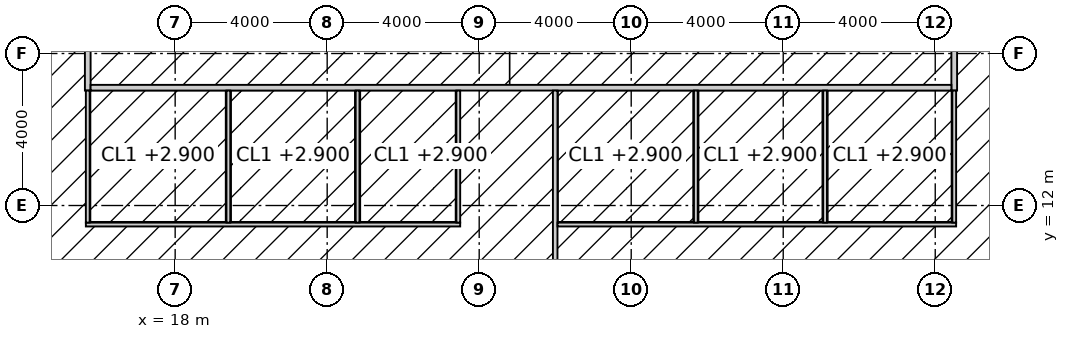
"""IFC4 building model, lengths in metres.
Left out: names, types, materials, properties, quantities, classifications, styles, units other than length and angle.
Written with IfcOpenShell. Run it as: python <this file> out.ifc"""

import sys

from ifc_helpers import new_model, si_unit, direction, frame, frame_2d, origin, place, context, subcontext, project, spatial, rectangle, extrude, element, fill, save


model = new_model("IFC4")
c1 = context("Model", 3, precision=1e-05, world=origin(), true_north=direction((0.0, 1.0)))
c2 = subcontext(c1, "Body", "Model", "MODEL_VIEW")
j1 = project(units=[si_unit("LENGTHUNIT", "METRE"), si_unit("PLANEANGLEUNIT", "RADIAN")], contexts=[c1])
p1 = place(None, origin())
s1 = spatial("IfcSite", under=j1, at=p1, CompositionType="ELEMENT")
p2 = place(p1, origin())
s2 = spatial("IfcBuilding", under=s1, at=p2, CompositionType="ELEMENT")
p3 = place(p2, frame((0.0, 0.0, 254.2)))
s3 = spatial("IfcBuildingStorey", under=s2, at=p3, CompositionType="ELEMENT", Elevation=254.2)
p4 = place(p3, frame((15.7, 15.025, 0.0), z_axis=(0.0, 0.0, 1.0), x_axis=(0.0, 1.0, 0.0)))
e1 = element("IfcWall", 1, at=p4, inside=s3, PredefinedType="PARTITIONING", context=c2, shape_type="SweptSolid", body=[
    extrude(rectangle(XDim=23.35, YDim=0.15, at=frame_2d((11.675, 0.0))), origin(), (0.0, 0.0, 1.0), 3.85),
])
p5 = place(p4, frame((10.775, 0.0, 0.0)))
e2 = element("IfcOpeningElement", 2, at=p5, cuts=e1, PredefinedType="OPENING", context=c2, shape_type="SweptSolid", body=[
    extrude(rectangle(XDim=1.8, YDim=2.4, at=frame_2d((0.9, 1.2))), frame((0.0, 0.085, 0.0), z_axis=(0.0, -1.0, 0.0), x_axis=(1.0, 0.0, 0.0)), (0.0, 0.0, 1.0), 0.17),
])
p6 = place(p3, frame((38.5, 15.025, 0.0), z_axis=(0.0, 0.0, 1.0), x_axis=(0.0, 1.0, 0.0)))
e3 = element("IfcWall", 3, at=p6, inside=s3, PredefinedType="PARTITIONING", context=c2, shape_type="SweptSolid", body=[
    extrude(rectangle(XDim=23.35, YDim=0.15, at=frame_2d((11.675, 0.0))), origin(), (0.0, 0.0, 1.0), 3.85),
])
p7 = place(p6, frame((7.275, 0.0, 0.0)))
e4 = element("IfcOpeningElement", 4, at=p7, cuts=e3, PredefinedType="OPENING", context=c2, shape_type="SweptSolid", body=[
    extrude(rectangle(XDim=1.8, YDim=2.4, at=frame_2d((0.9, 1.2))), frame((0.0, 0.085, 0.0), z_axis=(0.0, -1.0, 0.0), x_axis=(1.0, 0.0, 0.0)), (0.0, 0.0, 1.0), 0.17),
])
p8 = place(p6, frame((18.826, 0.0, 0.0)))
e5 = element("IfcOpeningElement", 5, at=p8, cuts=e3, PredefinedType="OPENING", context=c2, shape_type="SweptSolid", body=[
    extrude(rectangle(XDim=1.8, YDim=2.4, at=frame_2d((0.9, 1.2))), frame((0.0, 0.085, 0.0), z_axis=(0.0, -1.0, 0.0), x_axis=(1.0, 0.0, 0.0)), (0.0, 0.0, 1.0), 0.17),
])
p9 = place(p3, frame((15.775, 15.1, 0.0), z_axis=(0.0, 0.0, 1.0), x_axis=(1.0, 0.0, 0.0)))
e6 = element("IfcWall", 6, at=p9, inside=s3, PredefinedType="PARTITIONING", context=c2, shape_type="SweptSolid", body=[
    extrude(rectangle(XDim=22.65, YDim=0.15, at=frame_2d((11.325, 0.0))), origin(), (0.0, 0.0, 1.0), 3.85),
])
p10 = place(p3, frame((28.0, 4.3, 0.0), z_axis=(0.0, 0.0, 1.0), x_axis=(0.0, 1.0, 0.0)))
e7 = element("IfcWall", 7, at=p10, inside=s3, PredefinedType="PARTITIONING", context=c2, shape_type="SweptSolid", body=[
    extrude(rectangle(XDim=10.725, YDim=0.12, at=frame_2d((5.362, 0.0))), origin(), (0.0, 0.0, 1.0), 3.85),
])
p11 = place(p3, frame((15.65, 11.5, 0.0), z_axis=(0.0, 0.0, 1.0), x_axis=(1.0, 0.0, 0.0)))
e8 = element("IfcWall", 8, at=p11, inside=s3, PredefinedType="PARTITIONING", context=c2, shape_type="SweptSolid", body=[
    extrude(rectangle(XDim=9.85, YDim=0.1, at=frame_2d((4.925, 0.0))), origin(), (0.0, 0.0, 1.0), 3.85),
])
p12 = place(p11, frame((1.4, 0.0, 0.0)))
e9 = element("IfcOpeningElement", 9, at=p12, cuts=e8, PredefinedType="OPENING", context=c2, shape_type="SweptSolid", body=[
    extrude(rectangle(XDim=1.0, YDim=2.2, at=frame_2d((0.5, 1.1))), frame((0.0, 0.06, 0.0), z_axis=(0.0, -1.0, 0.0), x_axis=(1.0, 0.0, 0.0)), (0.0, 0.0, 1.0), 0.12),
])
p13 = place(p11, frame((4.95, 0.0, 0.0)))
e10 = element("IfcOpeningElement", 10, at=p13, cuts=e8, PredefinedType="OPENING", context=c2, shape_type="SweptSolid", body=[
    extrude(rectangle(XDim=1.0, YDim=2.2, at=frame_2d((0.5, 1.1))), frame((0.0, 0.06, 0.0), z_axis=(0.0, -1.0, 0.0), x_axis=(1.0, 0.0, 0.0)), (0.0, 0.0, 1.0), 0.12),
])
p14 = place(p11, frame((7.975, 0.0, 0.0)))
e11 = element("IfcOpeningElement", 11, at=p14, cuts=e8, PredefinedType="OPENING", context=c2, shape_type="SweptSolid", body=[
    extrude(rectangle(XDim=1.0, YDim=2.2, at=frame_2d((0.5, 1.1))), frame((0.0, 0.06, 0.0), z_axis=(0.0, -1.0, 0.0), x_axis=(1.0, 0.0, 0.0)), (0.0, 0.0, 1.0), 0.12),
])
p15 = place(p3, frame((28.061, 11.5, 0.0), z_axis=(0.0, 0.0, 1.0), x_axis=(1.0, 0.0, 0.0)))
e12 = element("IfcWall", 12, at=p15, inside=s3, PredefinedType="PARTITIONING", context=c2, shape_type="SweptSolid", body=[
    extrude(rectangle(XDim=10.489, YDim=0.1, at=frame_2d((5.245, 0.0))), origin(), (0.0, 0.0, 1.0), 3.85),
])
p16 = place(p15, frame((1.29, 0.0, 0.0)))
e13 = element("IfcOpeningElement", 13, at=p16, cuts=e12, PredefinedType="OPENING", context=c2, shape_type="SweptSolid", body=[
    extrude(rectangle(XDim=1.0, YDim=2.2, at=frame_2d((0.5, 1.1))), frame((0.0, 0.06, 0.0), z_axis=(0.0, -1.0, 0.0), x_axis=(1.0, 0.0, 0.0)), (0.0, 0.0, 1.0), 0.12),
])
p17 = place(p15, frame((4.84, 0.0, 0.0)))
e14 = element("IfcOpeningElement", 14, at=p17, cuts=e12, PredefinedType="OPENING", context=c2, shape_type="SweptSolid", body=[
    extrude(rectangle(XDim=1.0, YDim=2.2, at=frame_2d((0.5, 1.1))), frame((0.0, 0.06, 0.0), z_axis=(0.0, -1.0, 0.0), x_axis=(1.0, 0.0, 0.0)), (0.0, 0.0, 1.0), 0.12),
])
p18 = place(p15, frame((8.24, 0.0, 0.0)))
e15 = element("IfcOpeningElement", 15, at=p18, cuts=e12, PredefinedType="OPENING", context=c2, shape_type="SweptSolid", body=[
    extrude(rectangle(XDim=1.0, YDim=2.2, at=frame_2d((0.5, 1.1))), frame((0.0, 0.06, 0.0), z_axis=(0.0, -1.0, 0.0), x_axis=(1.0, 0.0, 0.0)), (0.0, 0.0, 1.0), 0.12),
])
for number, where, z_axis, x_axis in (
    (16, (15.7, 11.55, 0.0), (0.0, 0.0, 1.0), (0.0, 1.0, 0.0)),
    (17, (19.4, 11.55, 0.0), (0.0, 0.0, 1.0), (0.0, 1.0, 0.0)),
    (18, (22.8, 11.55, 0.0), (0.0, 0.0, 1.0), (0.0, 1.0, 0.0)),
    (19, (25.45, 11.55, 0.0), (0.0, 0.0, 1.0), (0.0, 1.0, 0.0)),
    (20, (31.701, 11.55, 0.0), (0.0, 0.0, 1.0), (0.0, 1.0, 0.0)),
    (21, (35.101, 11.55, 0.0), (0.0, 0.0, 1.0), (0.0, 1.0, 0.0)),
    (22, (38.5, 11.55, 0.0), (0.0, 0.0, 1.0), (0.0, 1.0, 0.0)),
):
    element("IfcWall", number, at=place(p3, frame(where, z_axis=z_axis, x_axis=x_axis)), inside=s3, PredefinedType="PARTITIONING", context=c2, shape_type="SweptSolid", body=[
        extrude(rectangle(XDim=3.475, YDim=0.1, at=frame_2d((1.737, 0.0))), origin(), (0.0, 0.0, 1.0), 3.85),
    ])
p19 = place(p12, origin())
e23 = element("IfcDoor", 23, at=p19, inside=s3, OperationType="SINGLE_SWING_RIGHT", PredefinedType="DOOR", context=c2, shape_type="SweptSolid", body=[
    extrude(rectangle(XDim=1.0, YDim=2.2, at=frame_2d((0.5, 1.1))), frame((0.0, 0.025, 0.0), z_axis=(0.0, -1.0, 0.0), x_axis=(1.0, 0.0, 0.0)), (0.0, 0.0, 1.0), 0.05),
])
fill(e9, e23)
p20 = place(p13, origin())
e24 = element("IfcDoor", 24, at=p20, inside=s3, OperationType="SINGLE_SWING_LEFT", PredefinedType="DOOR", context=c2, shape_type="SweptSolid", body=[
    extrude(rectangle(XDim=1.0, YDim=2.2, at=frame_2d((0.5, 1.1))), frame((0.0, 0.025, 0.0), z_axis=(0.0, -1.0, 0.0), x_axis=(1.0, 0.0, 0.0)), (0.0, 0.0, 1.0), 0.05),
])
fill(e10, e24)
p21 = place(p14, origin())
e25 = element("IfcDoor", 25, at=p21, inside=s3, OperationType="SINGLE_SWING_LEFT", PredefinedType="DOOR", context=c2, shape_type="SweptSolid", body=[
    extrude(rectangle(XDim=1.0, YDim=2.2, at=frame_2d((0.5, 1.1))), frame((0.0, 0.025, 0.0), z_axis=(0.0, -1.0, 0.0), x_axis=(1.0, 0.0, 0.0)), (0.0, 0.0, 1.0), 0.05),
])
fill(e11, e25)
p22 = place(p16, origin())
e26 = element("IfcDoor", 26, at=p22, inside=s3, OperationType="SINGLE_SWING_RIGHT", PredefinedType="DOOR", context=c2, shape_type="SweptSolid", body=[
    extrude(rectangle(XDim=1.0, YDim=2.2, at=frame_2d((0.5, 1.1))), frame((0.0, 0.025, 0.0), z_axis=(0.0, -1.0, 0.0), x_axis=(1.0, 0.0, 0.0)), (0.0, 0.0, 1.0), 0.05),
])
fill(e13, e26)
p23 = place(p17, origin())
e27 = element("IfcDoor", 27, at=p23, inside=s3, OperationType="SINGLE_SWING_LEFT", PredefinedType="DOOR", context=c2, shape_type="SweptSolid", body=[
    extrude(rectangle(XDim=1.0, YDim=2.2, at=frame_2d((0.5, 1.1))), frame((0.0, 0.025, 0.0), z_axis=(0.0, -1.0, 0.0), x_axis=(1.0, 0.0, 0.0)), (0.0, 0.0, 1.0), 0.05),
])
fill(e14, e27)
p24 = place(p18, origin())
e28 = element("IfcDoor", 28, at=p24, inside=s3, OperationType="SINGLE_SWING_LEFT", PredefinedType="DOOR", context=c2, shape_type="SweptSolid", body=[
    extrude(rectangle(XDim=1.0, YDim=2.2, at=frame_2d((0.5, 1.1))), frame((0.0, 0.025, 0.0), z_axis=(0.0, -1.0, 0.0), x_axis=(1.0, 0.0, 0.0)), (0.0, 0.0, 1.0), 0.05),
])
fill(e15, e28)
save(model, sys.argv[1])
